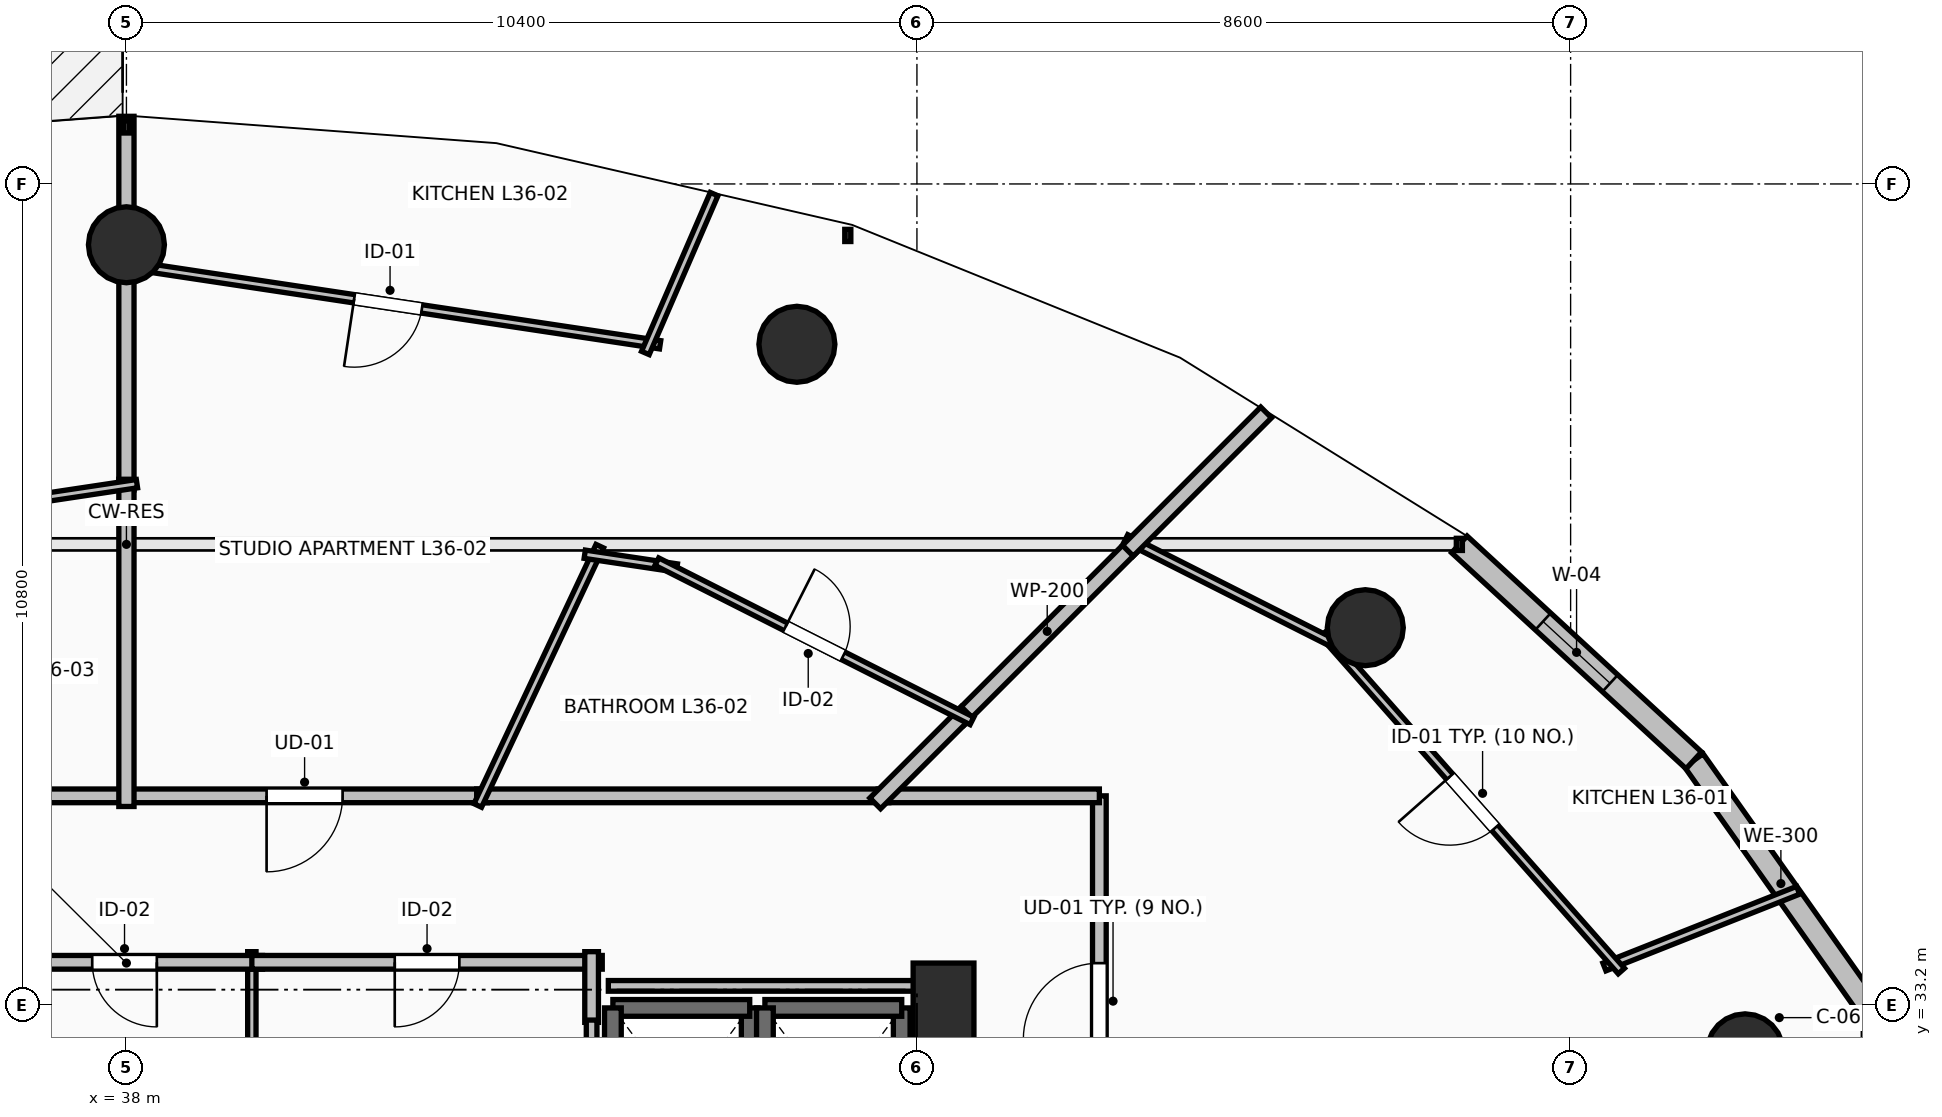
"""IFC4 building model, lengths in metres.
Left out: names, types, materials, properties, quantities, classifications, styles, units other than length and angle.
Written with IfcOpenShell. Run it as: python <this file> out.ifc"""

import sys

from ifc_helpers import new_model, si_unit, direction, frame, frame_2d, origin, origin_2d, place, context, subcontext, project, spatial, rectangle, circle, extrude, element, fill, save


model = new_model("IFC4")
c1 = context("Model", 3, precision=1e-05, world=origin(), true_north=direction((0.0, 1.0)))
c2 = subcontext(c1, "Body", "Model", "MODEL_VIEW")
j1 = project(units=[si_unit("LENGTHUNIT", "METRE"), si_unit("PLANEANGLEUNIT", "RADIAN")], contexts=[c1])
p1 = place(None, origin())
s1 = spatial("IfcSite", under=j1, at=p1, CompositionType="ELEMENT")
p2 = place(p1, origin())
s2 = spatial("IfcBuilding", under=s1, at=p2, CompositionType="ELEMENT")
p3 = place(p2, frame((0.0, 0.0, 136.1)))
s3 = spatial("IfcBuildingStorey", under=s2, at=p3, CompositionType="ELEMENT", Elevation=136.1)
for number, where, z_axis, x_axis in (
    (1, (59.295, 32.582, 0.0), (0.0, 0.0, 1.0), (0.924, 0.383, 0.0)),
    (2, (54.299, 38.162, 0.0), (0.0, 0.0, 1.0), (0.707, 0.707, 0.0)),
    (3, (46.821, 41.891, 0.0), (0.0, 0.0, 1.0), (0.383, 0.924, 0.0)),
    (4, (38.0, 43.2, 0.0), (0.0, 0.0, 1.0), (0.0, 1.0, 0.0)),
):
    element("IfcColumn", number, at=place(p3, frame(where, z_axis=z_axis, x_axis=x_axis)), inside=s3, PredefinedType="COLUMN", context=c2, shape_type="SweptSolid", body=[
        extrude(circle(Radius=0.5, at=origin_2d()), origin(), (0.0, 0.0, 1.0), 3.5),
    ])
p4 = place(p3, frame((48.75, 33.15, 0.0), z_axis=(0.0, 0.0, 1.0), x_axis=(1.0, 0.0, 0.0)))
e5 = element("IfcColumn", 5, at=p4, inside=s3, PredefinedType="PILASTER", context=c2, shape_type="SweptSolid", body=[
    extrude(rectangle(XDim=0.8, YDim=1.2, at=origin_2d()), origin(), (0.0, 0.0, 1.0), 3.5),
])
p5 = place(p3, frame((60.912, 33.175, 0.0), z_axis=(0.0, 0.0, 1.0), x_axis=(-0.577269753207, 0.816553508371, 0.0)))
e6 = element("IfcWall", 6, at=p5, inside=s3, PredefinedType="STANDARD", context=c2, shape_type="SweptSolid", body=[
    extrude(rectangle(XDim=3.97, YDim=0.3, at=frame_2d((1.985, 0.0))), origin(), (0.0, 0.0, 1.0), 3.24),
])
p6 = place(p3, frame((58.62, 36.417, 0.0), z_axis=(0.0, 0.0, 1.0), x_axis=(-0.735477154165, 0.677549522693, 0.0)))
e7 = element("IfcWall", 7, at=p6, inside=s3, PredefinedType="STANDARD", context=c2, shape_type="SweptSolid", body=[
    extrude(rectangle(XDim=4.194, YDim=0.3, at=frame_2d((2.097, 0.0))), origin(), (0.0, 0.0, 1.0), 3.24),
])
p7 = place(p6, frame((1.497, 0.0, 0.85)))
e8 = element("IfcOpeningElement", 8, at=p7, cuts=e7, PredefinedType="OPENING", context=c2, shape_type="SweptSolid", body=[
    extrude(rectangle(XDim=1.2, YDim=2.1, at=frame_2d((0.6, 1.05))), frame((0.0, 0.165, 0.0), z_axis=(0.0, -1.0, 0.0), x_axis=(1.0, 0.0, 0.0)), (0.0, 0.0, 1.0), 0.33),
])
p8 = place(p3, frame((46.2, 30.74, 0.0), z_axis=(0.0, 0.0, 1.0), x_axis=(0.0, 1.0, 0.0)))
e9 = element("IfcWall", 9, at=p8, inside=s3, PredefinedType="SOLIDWALL", context=c2, shape_type="SweptSolid", body=[
    extrude(rectangle(XDim=2.42, YDim=0.22, at=frame_2d((1.21, 0.0))), origin(), (0.0, 0.0, 1.0), 3.24),
])
p9 = place(p3, frame((46.2, 33.16, 0.0), z_axis=(0.0, 0.0, 1.0), x_axis=(-1.0, 0.0, 0.0)))
e10 = element("IfcWall", 10, at=p9, inside=s3, PredefinedType="SOLIDWALL", context=c2, shape_type="SweptSolid", body=[
    extrude(rectangle(XDim=1.8, YDim=0.22, at=frame_2d((0.9, 0.0))), origin(), (0.0, 0.0, 1.0), 3.24),
])
for number, where, z_axis, x_axis in (
    (11, (44.4, 33.16, 0.0), (0.0, 0.0, 1.0), (0.0, -1.0, 0.0)),
    (12, (48.2, 30.74, 0.0), (0.0, 0.0, 1.0), (0.0, 1.0, 0.0)),
):
    element("IfcWall", number, at=place(p3, frame(where, z_axis=z_axis, x_axis=x_axis)), inside=s3, PredefinedType="SOLIDWALL", context=c2, shape_type="SweptSolid", body=[
        extrude(rectangle(XDim=2.42, YDim=0.22, at=frame_2d((1.21, 0.0))), origin(), (0.0, 0.0, 1.0), 3.24),
    ])
p10 = place(p3, frame((48.2, 33.16, 0.0), z_axis=(0.0, 0.0, 1.0), x_axis=(-1.0, 0.0, 0.0)))
e13 = element("IfcWall", 13, at=p10, inside=s3, PredefinedType="SOLIDWALL", context=c2, shape_type="SweptSolid", body=[
    extrude(rectangle(XDim=1.8, YDim=0.22, at=frame_2d((0.9, 0.0))), origin(), (0.0, 0.0, 1.0), 3.24),
])
p11 = place(p3, frame((46.4, 33.16, 0.0), z_axis=(0.0, 0.0, 1.0), x_axis=(0.0, -1.0, 0.0)))
e14 = element("IfcWall", 14, at=p11, inside=s3, PredefinedType="SOLIDWALL", context=c2, shape_type="SweptSolid", body=[
    extrude(rectangle(XDim=2.42, YDim=0.22, at=frame_2d((1.21, 0.0))), origin(), (0.0, 0.0, 1.0), 3.24),
])
p12 = place(p3, frame((39.65, 30.34, 0.0), z_axis=(0.0, 0.0, 1.0), x_axis=(0.0, 1.0, 0.0)))
e15 = element("IfcWall", 15, at=p12, inside=s3, PredefinedType="PARTITIONING", context=c2, shape_type="SweptSolid", body=[
    extrude(rectangle(XDim=3.56, YDim=0.11, at=frame_2d((1.78, 0.0))), origin(), (0.0, 0.0, 1.0), 2.432),
])
p13 = place(p3, frame((39.79, 33.76, 0.0), z_axis=(0.0, 0.0, 1.0), x_axis=(-1.0, 0.0, 0.0)))
e16 = element("IfcWall", 16, at=p13, inside=s3, PredefinedType="PARTITIONING", context=c2, shape_type="SweptSolid", body=[
    extrude(rectangle(XDim=3.63, YDim=0.18, at=frame_2d((1.815, 0.0))), origin(), (0.0, 0.0, 1.0), 3.24),
])
p14 = place(p13, frame((1.39, 0.0, 0.0)))
e17 = element("IfcOpeningElement", 17, at=p14, cuts=e16, PredefinedType="OPENING", context=c2, shape_type="SweptSolid", body=[
    extrude(rectangle(XDim=0.85, YDim=2.1, at=frame_2d((0.425, 1.05))), frame((0.0, 0.105, 0.0), z_axis=(0.0, -1.0, 0.0), x_axis=(1.0, 0.0, 0.0)), (0.0, 0.0, 1.0), 0.21),
])
p15 = place(p3, frame((44.26, 33.76, 0.0), z_axis=(0.0, 0.0, 1.0), x_axis=(-1.0, 0.0, 0.0)))
e18 = element("IfcWall", 18, at=p15, inside=s3, PredefinedType="PARTITIONING", context=c2, shape_type="SweptSolid", body=[
    extrude(rectangle(XDim=4.61, YDim=0.18, at=frame_2d((2.305, 0.0))), origin(), (0.0, 0.0, 1.0), 3.24),
])
p16 = place(p15, frame((1.88, 0.0, 0.0)))
e19 = element("IfcOpeningElement", 19, at=p16, cuts=e18, PredefinedType="OPENING", context=c2, shape_type="SweptSolid", body=[
    extrude(rectangle(XDim=0.85, YDim=2.1, at=frame_2d((0.425, 1.05))), frame((0.0, 0.105, 0.0), z_axis=(0.0, -1.0, 0.0), x_axis=(1.0, 0.0, 0.0)), (0.0, 0.0, 1.0), 0.21),
])
p17 = place(p3, frame((44.12, 32.97, 0.0), z_axis=(0.0, 0.0, 1.0), x_axis=(0.0, 1.0, 0.0)))
e20 = element("IfcWall", 20, at=p17, inside=s3, PredefinedType="PARTITIONING", context=c2, shape_type="SweptSolid", body=[
    extrude(rectangle(XDim=0.93, YDim=0.18, at=frame_2d((0.465, 0.0))), origin(), (0.0, 0.0, 1.0), 3.24),
])
p18 = place(p3, frame((50.8, 30.548, 0.0), z_axis=(0.0, 0.0, 1.0), x_axis=(0.0, 1.0, 0.0)))
e21 = element("IfcWall", 21, at=p18, inside=s3, PredefinedType="PARTITIONING", context=c2, shape_type="SweptSolid", body=[
    extrude(rectangle(XDim=5.402, YDim=0.18, at=frame_2d((2.701, 0.0))), origin(), (0.0, 0.0, 1.0), 2.432),
])
p19 = place(p18, frame((2.201, 0.0, 0.0)))
e22 = element("IfcOpeningElement", 22, at=p19, cuts=e21, PredefinedType="OPENING", context=c2, shape_type="SweptSolid", body=[
    extrude(rectangle(XDim=1.0, YDim=2.15, at=frame_2d((0.5, 1.075))), frame((0.0, 0.105, 0.0), z_axis=(0.0, -1.0, 0.0), x_axis=(1.0, 0.0, 0.0)), (0.0, 0.0, 1.0), 0.21),
])
p20 = place(p3, frame((50.8, 35.95, 0.0), z_axis=(0.0, 0.0, 1.0), x_axis=(-1.0, 0.0, 0.0)))
e23 = element("IfcWall", 23, at=p20, inside=s3, PredefinedType="PARTITIONING", context=c2, shape_type="SweptSolid", body=[
    extrude(rectangle(XDim=2.91, YDim=0.18, at=frame_2d((1.455, 0.0))), origin(), (0.0, 0.0, 1.0), 2.432),
])
p21 = place(p3, frame((42.748, 35.95, 0.0), z_axis=(0.0, 0.0, 1.0), x_axis=(-1.0, 0.0, 0.0)))
e24 = element("IfcWall", 24, at=p21, inside=s3, PredefinedType="PARTITIONING", context=c2, shape_type="SweptSolid", body=[
    extrude(rectangle(XDim=4.808, YDim=0.18, at=frame_2d((2.404, 0.0))), origin(), (0.0, 0.0, 1.0), 3.24),
])
p22 = place(p21, frame((1.904, 0.0, 0.0)))
e25 = element("IfcOpeningElement", 25, at=p22, cuts=e24, PredefinedType="OPENING", context=c2, shape_type="SweptSolid", body=[
    extrude(rectangle(XDim=1.0, YDim=2.15, at=frame_2d((0.5, 1.075))), frame((0.0, 0.105, 0.0), z_axis=(0.0, -1.0, 0.0), x_axis=(1.0, 0.0, 0.0)), (0.0, 0.0, 1.0), 0.21),
])
p23 = place(p3, frame((48.03, 35.95, 0.0), z_axis=(0.0, 0.0, 1.0), x_axis=(-1.0, 0.0, 0.0)))
e26 = element("IfcWall", 26, at=p23, inside=s3, PredefinedType="PARTITIONING", context=c2, shape_type="SweptSolid", body=[
    extrude(rectangle(XDim=5.422, YDim=0.18, at=frame_2d((2.711, 0.0))), origin(), (0.0, 0.0, 1.0), 2.432),
])
p24 = place(p3, frame((38.08, 35.95, 0.0), z_axis=(0.0, 0.0, 1.0), x_axis=(-1.0, 0.0, 0.0)))
e27 = element("IfcWall", 27, at=p24, inside=s3, PredefinedType="PARTITIONING", context=c2, shape_type="SweptSolid", body=[
    extrude(rectangle(XDim=3.742, YDim=0.18, at=frame_2d((1.871, 0.0))), origin(), (0.0, 0.0, 1.0), 3.24),
])
p25 = place(p3, frame((59.993, 34.708, 0.0), z_axis=(0.0, 0.0, 1.0), x_axis=(-0.92976723416, -0.368147919025, 0.0)))
e28 = element("IfcWall", 28, at=p25, inside=s3, PredefinedType="PARTITIONING", context=c2, shape_type="SweptSolid", body=[
    extrude(rectangle(XDim=2.741, YDim=0.11, at=frame_2d((1.37, 0.0))), origin(), (0.0, 0.0, 1.0), 2.728),
])
p26 = place(p3, frame((57.668, 33.645, 0.0), z_axis=(0.0, 0.0, 1.0), x_axis=(-0.66214504072, 0.749375703536, 0.0)))
e29 = element("IfcWall", 29, at=p26, inside=s3, PredefinedType="PARTITIONING", context=c2, shape_type="SweptSolid", body=[
    extrude(rectangle(XDim=5.922, YDim=0.11, at=frame_2d((2.961, 0.0))), origin(), (0.0, 0.0, 1.0), 2.432),
])
p27 = place(p26, frame((2.511, 0.0, 0.0)))
e30 = element("IfcOpeningElement", 30, at=p27, cuts=e29, PredefinedType="OPENING", context=c2, shape_type="SweptSolid", body=[
    extrude(rectangle(XDim=0.9, YDim=2.1, at=frame_2d((0.45, 1.05))), frame((0.0, 0.07, 0.0), z_axis=(0.0, -1.0, 0.0), x_axis=(1.0, 0.0, 0.0)), (0.0, 0.0, 1.0), 0.14),
])
p28 = place(p3, frame((53.964, 37.915, 0.0), z_axis=(0.0, 0.0, 1.0), x_axis=(-0.892546166909, 0.450956028828, 0.0)))
e31 = element("IfcWall", 31, at=p28, inside=s3, PredefinedType="PARTITIONING", context=c2, shape_type="SweptSolid", body=[
    extrude(rectangle(XDim=3.154, YDim=0.11, at=frame_2d((1.577, 0.0))), origin(), (0.0, 0.0, 1.0), 2.432),
])
p29 = place(p3, frame((51.274, 39.274, 0.0), z_axis=(0.0, 0.0, 1.0), x_axis=(-0.707106781187, -0.707106781187, 0.0)))
e32 = element("IfcWall", 32, at=p29, inside=s3, PredefinedType="PARTITIONING", context=c2, shape_type="SweptSolid", body=[
    extrude(rectangle(XDim=3.281, YDim=0.2, at=frame_2d((1.64, 0.0))), origin(), (0.0, 0.0, 1.0), 2.874),
])
p30 = place(p3, frame((49.053, 37.053, 0.0), z_axis=(0.0, 0.0, 1.0), x_axis=(-0.707106781187, -0.707106781187, 0.0)))
e33 = element("IfcWall", 33, at=p30, inside=s3, PredefinedType="PARTITIONING", context=c2, shape_type="SweptSolid", body=[
    extrude(rectangle(XDim=1.7, YDim=0.2, at=frame_2d((0.85, 0.0))), origin(), (0.0, 0.0, 1.0), 2.432),
])
p31 = place(p3, frame((52.994, 40.994, 0.0), z_axis=(0.0, 0.0, 1.0), x_axis=(-0.707106781187, -0.707106781187, 0.0)))
e34 = element("IfcWall", 34, at=p31, inside=s3, PredefinedType="PARTITIONING", context=c2, shape_type="SweptSolid", body=[
    extrude(rectangle(XDim=2.572, YDim=0.2, at=frame_2d((1.286, 0.0))), origin(), (0.0, 0.0, 1.0), 2.728),
])
p32 = place(p3, frame((42.622, 35.823, 0.0), z_axis=(0.0, 0.0, 1.0), x_axis=(0.425768969191, 0.904831909735, 0.0)))
e35 = element("IfcWall", 35, at=p32, inside=s3, PredefinedType="PARTITIONING", context=c2, shape_type="SweptSolid", body=[
    extrude(rectangle(XDim=3.77, YDim=0.11, at=frame_2d((1.885, 0.0))), origin(), (0.0, 0.0, 1.0), 2.874),
])
p33 = place(p3, frame((44.03, 39.129, 0.0), z_axis=(0.0, 0.0, 1.0), x_axis=(0.988983067014, -0.148028690329, 0.0)))
e36 = element("IfcWall", 36, at=p33, inside=s3, PredefinedType="PARTITIONING", context=c2, shape_type="SweptSolid", body=[
    extrude(rectangle(XDim=1.225, YDim=0.11, at=frame_2d((0.613, 0.0))), origin(), (0.0, 0.0, 1.0), 2.874),
])
p34 = place(p3, frame((44.978, 39.031, 0.0), z_axis=(0.0, 0.0, 1.0), x_axis=(0.892495276856, -0.451056737882, 0.0)))
e37 = element("IfcWall", 37, at=p34, inside=s3, PredefinedType="PARTITIONING", context=c2, shape_type="SweptSolid", body=[
    extrude(rectangle(XDim=4.645, YDim=0.11, at=frame_2d((2.323, 0.0))), origin(), (0.0, 0.0, 1.0), 2.432),
])
p35 = place(p34, frame((1.898, 0.0, 0.0)))
e38 = element("IfcOpeningElement", 38, at=p35, cuts=e37, PredefinedType="OPENING", context=c2, shape_type="SweptSolid", body=[
    extrude(rectangle(XDim=0.85, YDim=2.1, at=frame_2d((0.425, 1.05))), frame((0.0, 0.07, 0.0), z_axis=(0.0, -1.0, 0.0), x_axis=(1.0, 0.0, 0.0)), (0.0, 0.0, 1.0), 0.14),
])
p36 = place(p3, frame((45.021, 41.884, 0.0), z_axis=(0.0, 0.0, 1.0), x_axis=(-0.988887079739, 0.148668569392, 0.0)))
e39 = element("IfcWall", 39, at=p36, inside=s3, PredefinedType="PARTITIONING", context=c2, shape_type="SweptSolid", body=[
    extrude(rectangle(XDim=7.24, YDim=0.11, at=frame_2d((3.62, 0.0))), origin(), (0.0, 0.0, 1.0), 2.432),
])
p37 = place(p36, frame((3.17, 0.0, 0.0)))
e40 = element("IfcOpeningElement", 40, at=p37, cuts=e39, PredefinedType="OPENING", context=c2, shape_type="SweptSolid", body=[
    extrude(rectangle(XDim=0.9, YDim=2.1, at=frame_2d((0.45, 1.05))), frame((0.0, 0.07, 0.0), z_axis=(0.0, -1.0, 0.0), x_axis=(1.0, 0.0, 0.0)), (0.0, 0.0, 1.0), 0.14),
])
p38 = place(p3, frame((45.732, 43.866, 0.0), z_axis=(0.0, 0.0, 1.0), x_axis=(-0.397125966554, -0.91776411277, 0.0)))
e41 = element("IfcWall", 41, at=p38, inside=s3, PredefinedType="PARTITIONING", context=c2, shape_type="SweptSolid", body=[
    extrude(rectangle(XDim=2.277, YDim=0.11, at=frame_2d((1.139, 0.0))), origin(), (0.0, 0.0, 1.0), 2.728),
])
p39 = place(p3, frame((38.0, 42.94, 0.0), z_axis=(0.0, 0.0, 1.0), x_axis=(0.0, -1.0, 0.0)))
e42 = element("IfcWall", 42, at=p39, inside=s3, PredefinedType="PARTITIONING", context=c2, shape_type="SweptSolid", body=[
    extrude(rectangle(XDim=2.965, YDim=0.2, at=frame_2d((1.482, 0.0))), origin(), (0.0, 0.0, 1.0), 2.874),
])
p40 = place(p3, frame((38.0, 40.115, 0.0), z_axis=(0.0, 0.0, 1.0), x_axis=(0.0, -1.0, 0.0)))
e43 = element("IfcWall", 43, at=p40, inside=s3, PredefinedType="PARTITIONING", context=c2, shape_type="SweptSolid", body=[
    extrude(rectangle(XDim=4.305, YDim=0.2, at=frame_2d((2.152, 0.0))), origin(), (0.0, 0.0, 1.0), 2.874),
])
p41 = place(p3, frame((38.0, 44.89, 0.0), z_axis=(0.0, 0.0, 1.0), x_axis=(0.0, -1.0, 0.0)))
e44 = element("IfcWall", 44, at=p41, inside=s3, PredefinedType="PARTITIONING", context=c2, shape_type="SweptSolid", body=[
    extrude(rectangle(XDim=2.09, YDim=0.2, at=frame_2d((1.045, 0.0))), origin(), (0.0, 0.0, 1.0), 3.24),
])
p42 = place(p3, frame((33.068, 39.294, 0.0), z_axis=(0.0, 0.0, 1.0), x_axis=(0.988876905643, 0.148736227888, 0.0)))
e45 = element("IfcWall", 45, at=p42, inside=s3, PredefinedType="PARTITIONING", context=c2, shape_type="SweptSolid", body=[
    extrude(rectangle(XDim=5.128, YDim=0.11, at=frame_2d((2.564, 0.0))), origin(), (0.0, 0.0, 1.0), 2.432),
])
p43 = place(p42, frame((2.139, 0.0, 0.0)))
e46 = element("IfcOpeningElement", 46, at=p43, cuts=e45, PredefinedType="OPENING", context=c2, shape_type="SweptSolid", body=[
    extrude(rectangle(XDim=0.85, YDim=2.1, at=frame_2d((0.425, 1.05))), frame((0.0, 0.07, 0.0), z_axis=(0.0, -1.0, 0.0), x_axis=(1.0, 0.0, 0.0)), (0.0, 0.0, 1.0), 0.14),
])
p44 = place(p3, frame((44.12, 30.34, 0.0), z_axis=(0.0, 0.0, 1.0), x_axis=(0.0, 1.0, 0.0)))
e47 = element("IfcWall", 47, at=p44, inside=s3, PredefinedType="PARTITIONING", context=c2, shape_type="SweptSolid", body=[
    extrude(rectangle(XDim=2.66, YDim=0.14, at=frame_2d((1.33, 0.0))), origin(), (0.0, 0.0, 1.0), 3.24),
])
p45 = place(p3, frame((48.55, 28.196, 0.0), z_axis=(0.0, 0.0, 1.0), x_axis=(0.0, 1.0, 0.0)))
e48 = element("IfcWall", 48, at=p45, inside=s3, PredefinedType="PARTITIONING", context=c2, shape_type="SweptSolid", body=[
    extrude(rectangle(XDim=5.254, YDim=0.14, at=frame_2d((2.627, 0.0))), origin(), (0.0, 0.0, 1.0), 2.432),
])
p46 = place(p3, frame((48.55, 33.45, 0.0), z_axis=(0.0, 0.0, 1.0), x_axis=(-1.0, 0.0, 0.0)))
e49 = element("IfcWall", 49, at=p46, inside=s3, PredefinedType="PARTITIONING", context=c2, shape_type="SweptSolid", body=[
    extrude(rectangle(XDim=4.21, YDim=0.14, at=frame_2d((2.105, 0.0))), origin(), (0.0, 0.0, 1.0), 2.432),
])
p47 = place(p7, origin())
e50 = element("IfcWindow", 50, at=p47, inside=s3, PartitioningType="SINGLE_PANEL", PredefinedType="WINDOW", context=c2, shape_type="SweptSolid", body=[
    extrude(rectangle(XDim=1.2, YDim=2.1, at=frame_2d((0.6, 1.05))), frame((0.0, 0.03, 0.0), z_axis=(0.0, -1.0, 0.0), x_axis=(1.0, 0.0, 0.0)), (0.0, 0.0, 1.0), 0.06),
])
fill(e8, e50)
p48 = place(p14, origin())
e51 = element("IfcDoor", 51, at=p48, inside=s3, OperationType="SINGLE_SWING_LEFT", PredefinedType="DOOR", context=c2, shape_type="SweptSolid", body=[
    extrude(rectangle(XDim=0.85, YDim=2.1, at=frame_2d((0.425, 1.05))), frame((0.0, 0.025, 0.0), z_axis=(0.0, -1.0, 0.0), x_axis=(1.0, 0.0, 0.0)), (0.0, 0.0, 1.0), 0.05),
])
fill(e17, e51)
p49 = place(p16, origin())
e52 = element("IfcDoor", 52, at=p49, inside=s3, OperationType="SINGLE_SWING_RIGHT", PredefinedType="DOOR", context=c2, shape_type="SweptSolid", body=[
    extrude(rectangle(XDim=0.85, YDim=2.1, at=frame_2d((0.425, 1.05))), frame((0.0, 0.025, 0.0), z_axis=(0.0, -1.0, 0.0), x_axis=(1.0, 0.0, 0.0)), (0.0, 0.0, 1.0), 0.05),
])
fill(e19, e52)
p50 = place(p19, origin())
e53 = element("IfcDoor", 53, at=p50, inside=s3, OperationType="SINGLE_SWING_LEFT", PredefinedType="DOOR", context=c2, shape_type="SweptSolid", body=[
    extrude(rectangle(XDim=1.0, YDim=2.15, at=frame_2d((0.5, 1.075))), frame((0.0, 0.025, 0.0), z_axis=(0.0, -1.0, 0.0), x_axis=(1.0, 0.0, 0.0)), (0.0, 0.0, 1.0), 0.05),
])
fill(e22, e53)
p51 = place(p22, origin())
e54 = element("IfcDoor", 54, at=p51, inside=s3, OperationType="SINGLE_SWING_RIGHT", PredefinedType="DOOR", context=c2, shape_type="SweptSolid", body=[
    extrude(rectangle(XDim=1.0, YDim=2.15, at=frame_2d((0.5, 1.075))), frame((0.0, 0.025, 0.0), z_axis=(0.0, -1.0, 0.0), x_axis=(1.0, 0.0, 0.0)), (0.0, 0.0, 1.0), 0.05),
])
fill(e25, e54)
p52 = place(p27, origin())
e55 = element("IfcDoor", 55, at=p52, inside=s3, OperationType="SINGLE_SWING_RIGHT", PredefinedType="DOOR", context=c2, shape_type="SweptSolid", body=[
    extrude(rectangle(XDim=0.9, YDim=2.1, at=frame_2d((0.45, 1.05))), frame((0.0, 0.025, 0.0), z_axis=(0.0, -1.0, 0.0), x_axis=(1.0, 0.0, 0.0)), (0.0, 0.0, 1.0), 0.05),
])
fill(e30, e55)
p53 = place(p35, origin())
e56 = element("IfcDoor", 56, at=p53, inside=s3, OperationType="SINGLE_SWING_LEFT", PredefinedType="DOOR", context=c2, shape_type="SweptSolid", body=[
    extrude(rectangle(XDim=0.85, YDim=2.1, at=frame_2d((0.425, 1.05))), frame((0.0, 0.025, 0.0), z_axis=(0.0, -1.0, 0.0), x_axis=(1.0, 0.0, 0.0)), (0.0, 0.0, 1.0), 0.05),
])
fill(e38, e56)
p54 = place(p37, origin())
e57 = element("IfcDoor", 57, at=p54, inside=s3, OperationType="SINGLE_SWING_RIGHT", PredefinedType="DOOR", context=c2, shape_type="SweptSolid", body=[
    extrude(rectangle(XDim=0.9, YDim=2.1, at=frame_2d((0.45, 1.05))), frame((0.0, 0.025, 0.0), z_axis=(0.0, -1.0, 0.0), x_axis=(1.0, 0.0, 0.0)), (0.0, 0.0, 1.0), 0.05),
])
fill(e40, e57)
save(model, sys.argv[1])
